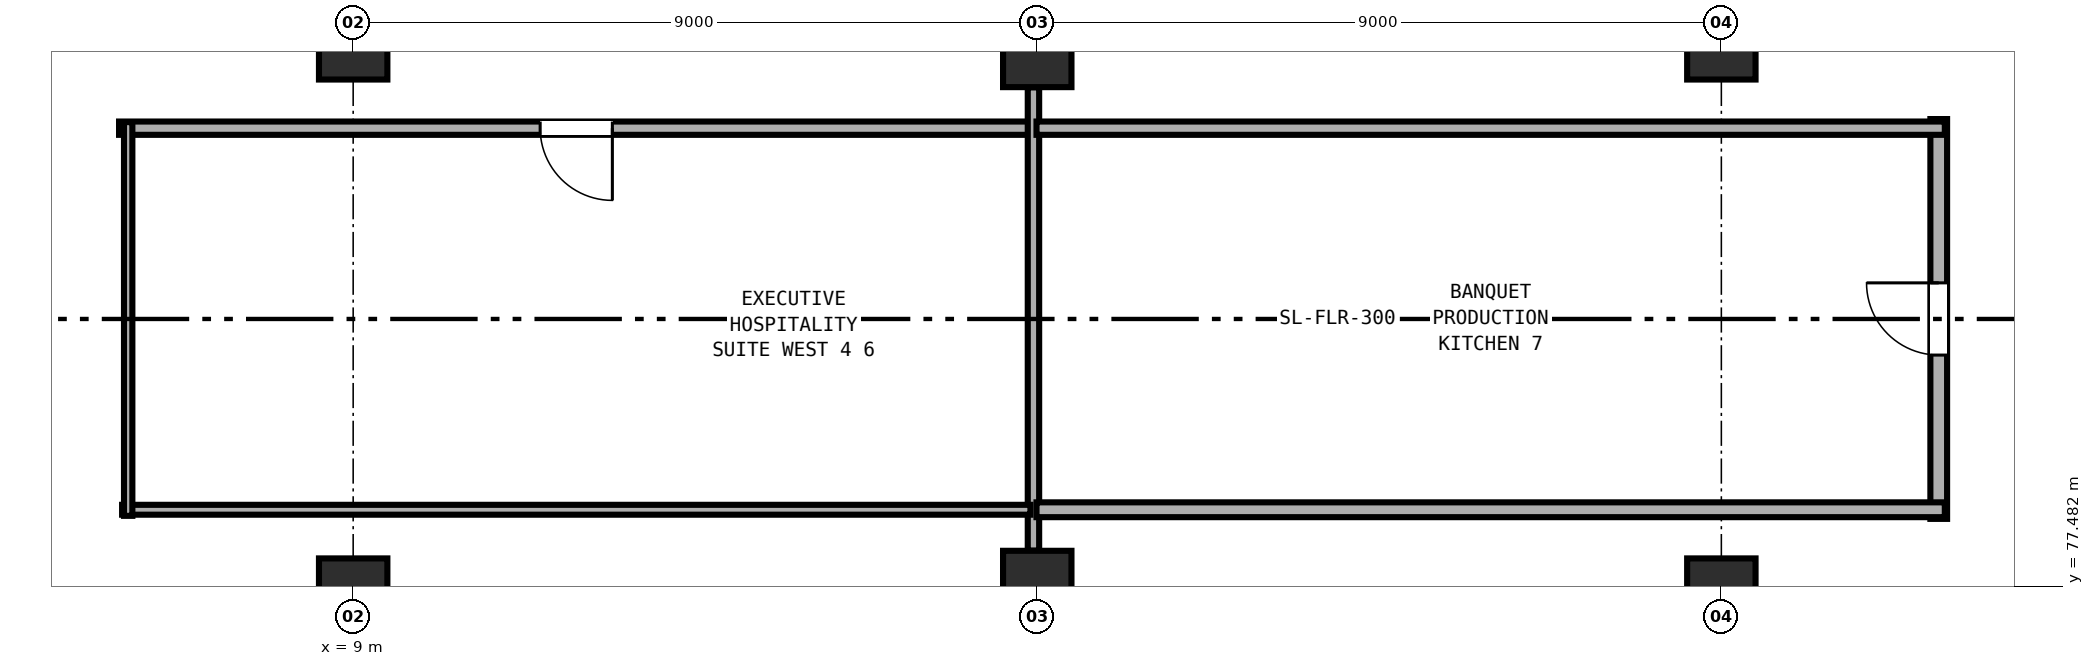
"""IFC4 building model, lengths in metres.
Left out: names, types, materials, properties, quantities, classifications, styles, units other than length and angle.
Written with IfcOpenShell. Run it as: python <this file> out.ifc"""

import sys

from ifc_helpers import new_model, si_unit, direction, frame, frame_2d, origin, origin_2d, place, context, subcontext, project, spatial, rectangle, extrude, element, fill, save


model = new_model("IFC4")
c1 = context("Model", 3, precision=1e-05, world=origin(), true_north=direction((0.0, 1.0)))
c2 = subcontext(c1, "Body", "Model", "MODEL_VIEW")
j1 = project(units=[si_unit("LENGTHUNIT", "METRE"), si_unit("PLANEANGLEUNIT", "RADIAN")], contexts=[c1])
p1 = place(None, origin())
s1 = spatial("IfcSite", under=j1, at=p1, CompositionType="ELEMENT")
p2 = place(p1, origin())
s2 = spatial("IfcBuilding", under=s1, at=p2, CompositionType="ELEMENT")
p3 = place(p2, frame((0.0, 0.0, 14.4)))
s3 = spatial("IfcBuildingStorey", under=s2, at=p3, CompositionType="ELEMENT", Elevation=14.4)
for number, where, z_axis, x_axis in (
    (1, (9.0, 77.4, 0.0), (0.0, 0.0, 1.0), (1.0, 0.0, 0.0)),
    (2, (9.0, 84.6, 0.0), (0.0, 0.0, 1.0), (1.0, 0.0, 0.0)),
):
    element("IfcColumn", number, at=place(p3, frame(where, z_axis=z_axis, x_axis=x_axis)), inside=s3, PredefinedType="COLUMN", context=c2, shape_type="SweptSolid", body=[
        extrude(rectangle(XDim=0.9, YDim=0.9, at=origin_2d()), origin(), (0.0, 0.0, 1.0), 4.8),
    ])
for number, where, z_axis, x_axis in (
    (3, (18.0, 77.4, 0.0), (0.0, 0.0, 1.0), (1.0, 0.0, 0.0)),
    (4, (18.0, 84.6, 0.0), (0.0, 0.0, 1.0), (1.0, 0.0, 0.0)),
):
    element("IfcColumn", number, at=place(p3, frame(where, z_axis=z_axis, x_axis=x_axis)), inside=s3, PredefinedType="COLUMN", context=c2, shape_type="SweptSolid", body=[
        extrude(rectangle(XDim=0.9, YDim=1.1, at=origin_2d()), origin(), (0.0, 0.0, 1.0), 4.8),
    ])
for number, where, z_axis, x_axis in (
    (5, (27.0, 77.4, 0.0), (0.0, 0.0, 1.0), (1.0, 0.0, 0.0)),
    (6, (27.0, 84.6, 0.0), (0.0, 0.0, 1.0), (1.0, 0.0, 0.0)),
):
    element("IfcColumn", number, at=place(p3, frame(where, z_axis=z_axis, x_axis=x_axis)), inside=s3, PredefinedType="COLUMN", context=c2, shape_type="SweptSolid", body=[
        extrude(rectangle(XDim=0.9, YDim=0.9, at=origin_2d()), origin(), (0.0, 0.0, 1.0), 4.8),
    ])
p4 = place(p3, frame((17.95, 83.51, 0.0), z_axis=(0.0, 0.0, 1.0), x_axis=(-1.0, 0.0, 0.0)))
e7 = element("IfcWall", 7, at=p4, inside=s3, PredefinedType="PARTITIONING", context=c2, shape_type="SweptSolid", body=[
    extrude(rectangle(XDim=12.03, YDim=0.175, at=frame_2d((6.015, 0.0))), origin(), (0.0, 0.0, 1.0), 3.56),
])
p5 = place(p4, frame((5.54, 0.0, 0.0)))
e8 = element("IfcOpeningElement", 8, at=p5, cuts=e7, PredefinedType="OPENING", context=c2, shape_type="SweptSolid", body=[
    extrude(rectangle(XDim=0.95, YDim=2.1, at=frame_2d((0.475, 1.05))), frame((0.0, 0.097, 0.0), z_axis=(0.0, -1.0, 0.0), x_axis=(1.0, 0.0, 0.0)), (0.0, 0.0, 1.0), 0.195),
])
p6 = place(p3, frame((17.95, 84.048, 0.0), z_axis=(0.0, 0.0, 1.0), x_axis=(0.0, -1.0, 0.0)))
e9 = element("IfcWall", 9, at=p6, inside=s3, PredefinedType="PARTITIONING", context=c2, shape_type="SweptSolid", body=[
    extrude(rectangle(XDim=6.096, YDim=0.15, at=frame_2d((3.048, 0.0))), origin(), (0.0, 0.0, 1.0), 3.56),
])
p7 = place(p3, frame((17.91, 78.49, 0.0), z_axis=(0.0, 0.0, 1.0), x_axis=(-1.0, 0.0, 0.0)))
e10 = element("IfcWall", 10, at=p7, inside=s3, PredefinedType="PARTITIONING", context=c2, shape_type="SweptSolid", body=[
    extrude(rectangle(XDim=11.95, YDim=0.13, at=frame_2d((5.975, 0.0))), origin(), (0.0, 0.0, 1.0), 3.56),
])
p8 = place(p3, frame((6.04, 78.41, 0.0), z_axis=(0.0, 0.0, 1.0), x_axis=(0.0, 1.0, 0.0)))
e11 = element("IfcWall", 11, at=p8, inside=s3, PredefinedType="PARTITIONING", context=c2, shape_type="SweptSolid", body=[
    extrude(rectangle(XDim=5.18, YDim=0.11, at=frame_2d((2.59, 0.0))), origin(), (0.0, 0.0, 1.0), 3.56),
])
p9 = place(p3, frame((29.86, 78.37, 0.0), z_axis=(0.0, 0.0, 1.0), x_axis=(0.0, 1.0, 0.0)))
e12 = element("IfcWall", 12, at=p9, inside=s3, PredefinedType="PARTITIONING", context=c2, shape_type="SweptSolid", body=[
    extrude(rectangle(XDim=5.26, YDim=0.22, at=frame_2d((2.63, 0.0))), origin(), (0.0, 0.0, 1.0), 3.56),
])
p10 = place(p9, frame((2.155, 0.0, 0.0)))
e13 = element("IfcOpeningElement", 13, at=p10, cuts=e12, PredefinedType="OPENING", context=c2, shape_type="SweptSolid", body=[
    extrude(rectangle(XDim=0.95, YDim=2.18, at=frame_2d((0.475, 1.09))), frame((0.0, 0.12, 0.0), z_axis=(0.0, -1.0, 0.0), x_axis=(1.0, 0.0, 0.0)), (0.0, 0.0, 1.0), 0.24),
])
p11 = place(p3, frame((29.94, 78.49, 0.0), z_axis=(0.0, 0.0, 1.0), x_axis=(-1.0, 0.0, 0.0)))
e14 = element("IfcWall", 14, at=p11, inside=s3, PredefinedType="PARTITIONING", context=c2, shape_type="SweptSolid", body=[
    extrude(rectangle(XDim=11.95, YDim=0.195, at=frame_2d((5.975, 0.0))), origin(), (0.0, 0.0, 1.0), 3.56),
])
p12 = place(p3, frame((17.99, 83.51, 0.0), z_axis=(0.0, 0.0, 1.0), x_axis=(1.0, 0.0, 0.0)))
e15 = element("IfcWall", 15, at=p12, inside=s3, PredefinedType="PARTITIONING", context=c2, shape_type="SweptSolid", body=[
    extrude(rectangle(XDim=11.95, YDim=0.175, at=frame_2d((5.975, 0.0))), origin(), (0.0, 0.0, 1.0), 3.56),
])
p13 = place(p5, origin())
e16 = element("IfcDoor", 16, at=p13, inside=s3, OperationType="SINGLE_SWING_LEFT", PredefinedType="DOOR", context=c2, shape_type="SweptSolid", body=[
    extrude(rectangle(XDim=0.95, YDim=2.1, at=frame_2d((0.475, 1.05))), frame((0.0, 0.025, 0.0), z_axis=(0.0, -1.0, 0.0), x_axis=(1.0, 0.0, 0.0)), (0.0, 0.0, 1.0), 0.05),
])
fill(e8, e16)
p14 = place(p10, origin())
e17 = element("IfcDoor", 17, at=p14, inside=s3, OperationType="SINGLE_SWING_RIGHT", PredefinedType="DOOR", context=c2, shape_type="SweptSolid", body=[
    extrude(rectangle(XDim=0.95, YDim=2.18, at=frame_2d((0.475, 1.09))), frame((0.0, 0.025, 0.0), z_axis=(0.0, -1.0, 0.0), x_axis=(1.0, 0.0, 0.0)), (0.0, 0.0, 1.0), 0.05),
])
fill(e13, e17)
save(model, sys.argv[1])
